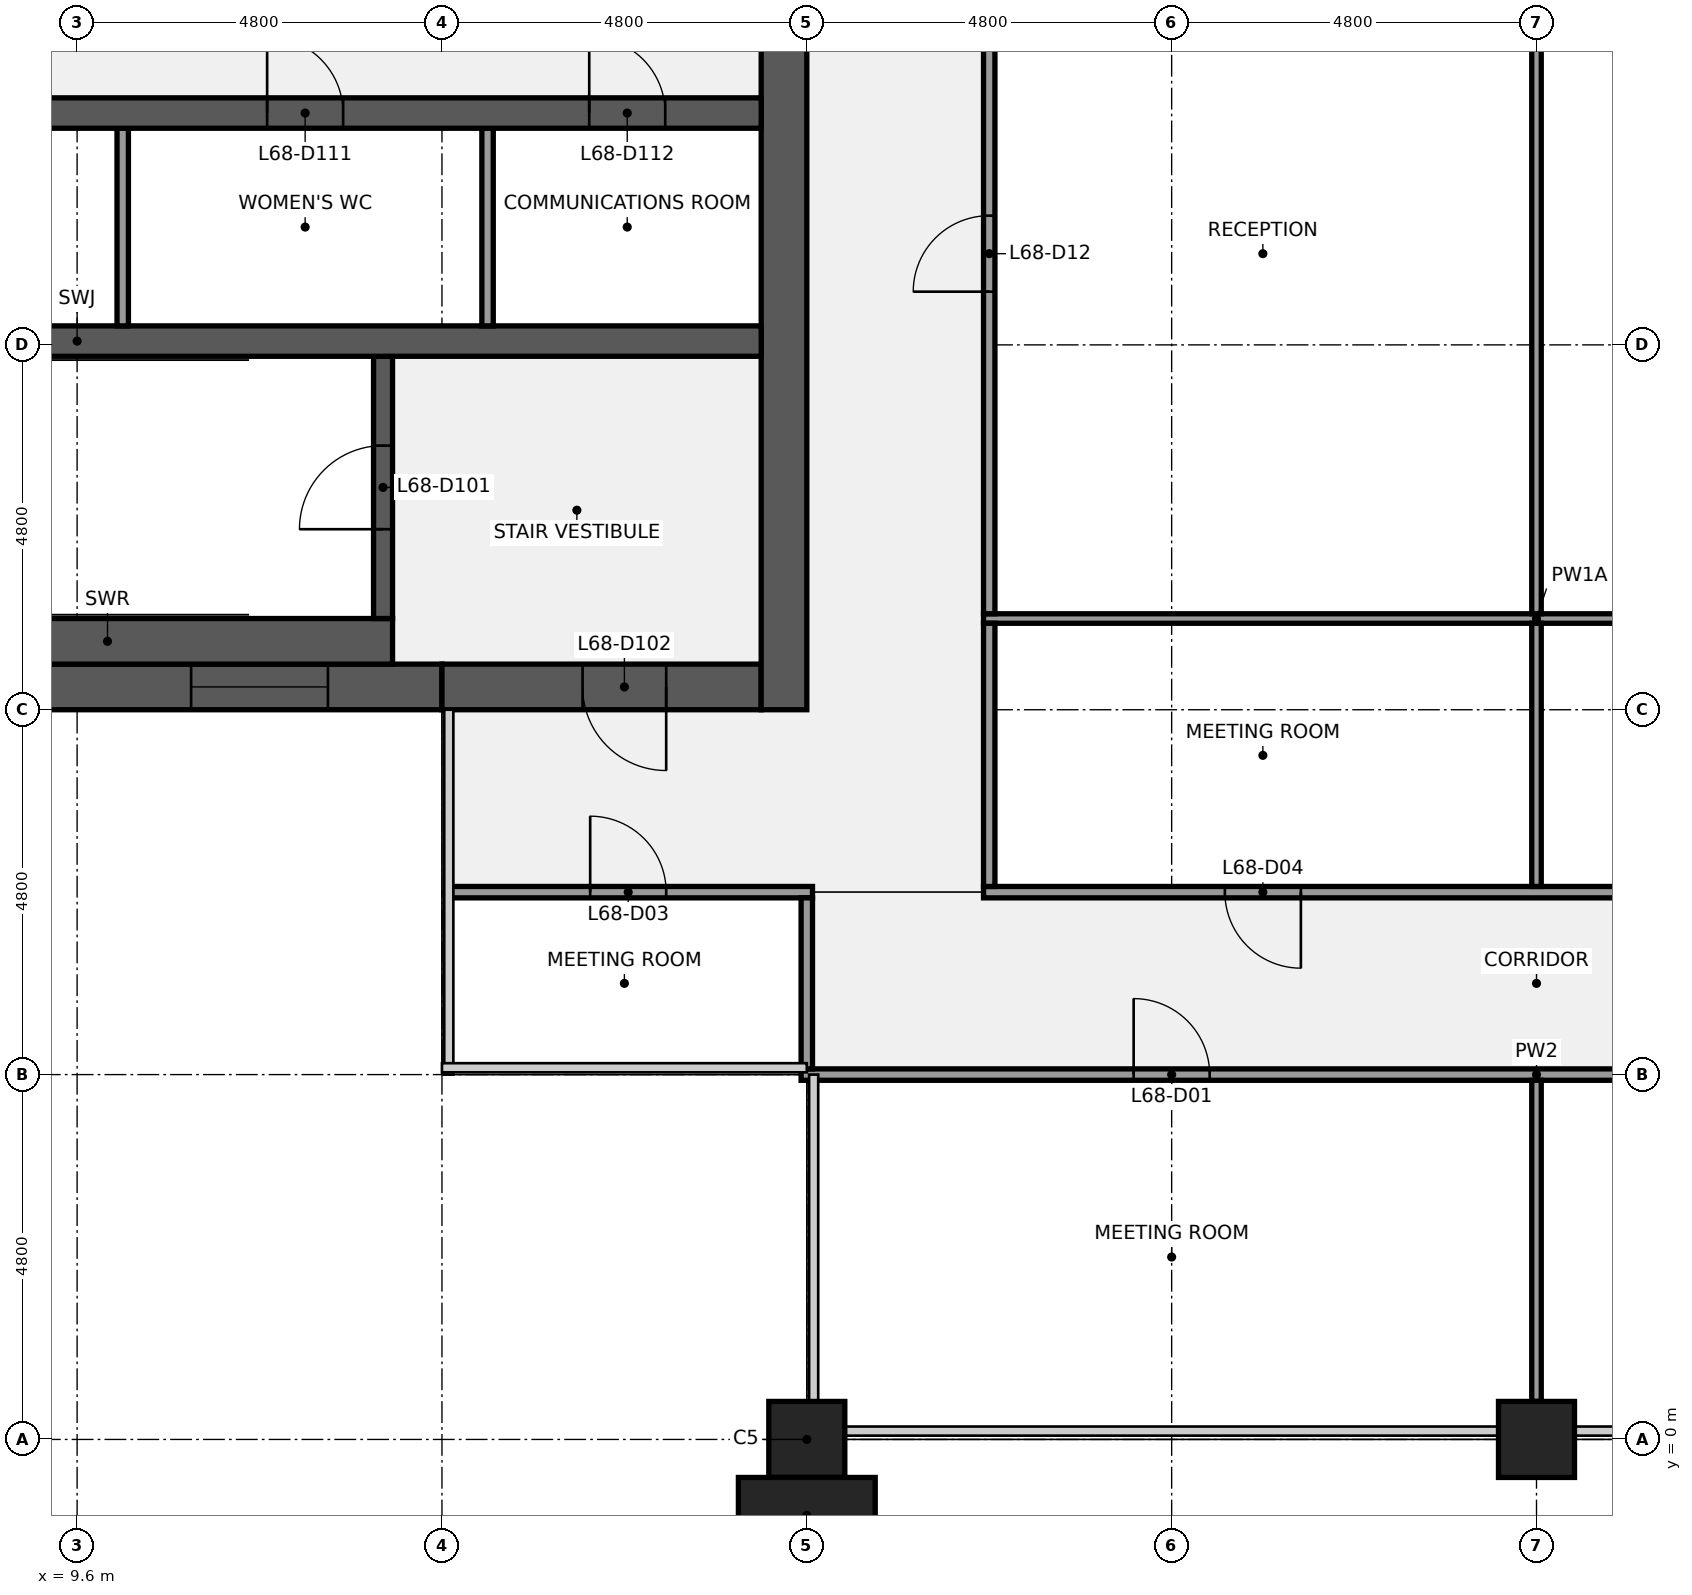
"""IFC4 building model, lengths in metres.
Left out: names, types, materials, properties, quantities, classifications, styles, units other than length and angle.
Written with IfcOpenShell. Run it as: python <this file> out.ifc"""

import sys

from ifc_helpers import new_model, si_unit, direction, frame, frame_2d, origin, origin_2d, place, context, subcontext, project, spatial, rectangle, extrude, element, fill, save


model = new_model("IFC4")
c1 = context("Model", 3, precision=1e-05, world=origin(), true_north=direction((0.0, 1.0)))
c2 = subcontext(c1, "Body", "Model", "MODEL_VIEW")
j1 = project(units=[si_unit("LENGTHUNIT", "METRE"), si_unit("PLANEANGLEUNIT", "RADIAN")], contexts=[c1])
p1 = place(None, origin())
s1 = spatial("IfcSite", under=j1, at=p1, CompositionType="ELEMENT")
p2 = place(p1, origin())
s2 = spatial("IfcBuilding", under=s1, at=p2, CompositionType="ELEMENT")
p3 = place(p2, frame((0.0, 0.0, 310.3)))
s3 = spatial("IfcBuildingStorey", under=s2, at=p3, CompositionType="ELEMENT", Elevation=310.3)
for number, where, z_axis, x_axis in (
    (1, (19.2, 0.0, 0.0), (0.0, 0.0, 1.0), (1.0, 0.0, 0.0)),
    (2, (28.8, 0.0, 0.0), (0.0, 0.0, 1.0), (1.0, 0.0, 0.0)),
):
    element("IfcColumn", number, at=place(p3, frame(where, z_axis=z_axis, x_axis=x_axis)), inside=s3, PredefinedType="COLUMN", context=c2, shape_type="SweptSolid", body=[
        extrude(rectangle(XDim=1.0, YDim=1.0, at=origin_2d()), origin(), (0.0, 0.0, 1.0), 4.0),
    ])
p4 = place(p3, frame((14.4, 9.9, 0.0), z_axis=(0.0, 0.0, 1.0), x_axis=(-1.0, 0.0, 0.0)))
e3 = element("IfcWall", 3, at=p4, inside=s3, PredefinedType="SHEAR", context=c2, shape_type="SweptSolid", body=[
    extrude(rectangle(XDim=13.8, YDim=0.6, at=frame_2d((6.9, 0.0))), origin(), (0.0, 0.0, 1.0), 3.84),
])
p5 = place(p4, frame((6.3, 0.0, 0.9)))
e4 = element("IfcOpeningElement", 4, at=p5, cuts=e3, PredefinedType="OPENING", context=c2, shape_type="SweptSolid", body=[
    extrude(rectangle(XDim=1.8, YDim=1.5, at=frame_2d((0.9, 0.75))), frame((0.0, 0.31, 0.0), z_axis=(0.0, -1.0, 0.0), x_axis=(1.0, 0.0, 0.0)), (0.0, 0.0, 1.0), 0.62),
])
p6 = place(p4, frame((1.5, 0.0, 0.9)))
e5 = element("IfcOpeningElement", 5, at=p6, cuts=e3, PredefinedType="OPENING", context=c2, shape_type="SweptSolid", body=[
    extrude(rectangle(XDim=1.8, YDim=1.5, at=frame_2d((0.9, 0.75))), frame((0.0, 0.31, 0.0), z_axis=(0.0, -1.0, 0.0), x_axis=(1.0, 0.0, 0.0)), (0.0, 0.0, 1.0), 0.62),
])
p7 = place(p3, frame((18.6, 9.9, 0.0), z_axis=(0.0, 0.0, 1.0), x_axis=(-1.0, 0.0, 0.0)))
e6 = element("IfcWall", 6, at=p7, inside=s3, PredefinedType="SHEAR", context=c2, shape_type="SweptSolid", body=[
    extrude(rectangle(XDim=4.2, YDim=0.6, at=frame_2d((2.1, 0.0))), origin(), (0.0, 0.0, 1.0), 3.84),
])
p8 = place(p7, frame((1.25, 0.0, 0.0)))
e7 = element("IfcOpeningElement", 7, at=p8, cuts=e6, PredefinedType="OPENING", context=c2, shape_type="SweptSolid", body=[
    extrude(rectangle(XDim=1.1, YDim=2.1, at=frame_2d((0.55, 1.05))), frame((0.0, 0.31, 0.0), z_axis=(0.0, -1.0, 0.0), x_axis=(1.0, 0.0, 0.0)), (0.0, 0.0, 1.0), 0.62),
])
p9 = place(p3, frame((18.9, 38.4, 0.0), z_axis=(0.0, 0.0, 1.0), x_axis=(0.0, -1.0, 0.0)))
e8 = element("IfcWall", 8, at=p9, inside=s3, PredefinedType="SHEAR", context=c2, shape_type="SweptSolid", body=[
    extrude(rectangle(XDim=28.8, YDim=0.6, at=frame_2d((14.4, 0.0))), origin(), (0.0, 0.0, 1.0), 3.84),
])
p10 = place(p9, frame((18.3, 0.0, 0.0)))
e9 = element("IfcOpeningElement", 9, at=p10, cuts=e8, PredefinedType="OPENING", context=c2, shape_type="SweptSolid", body=[
    extrude(rectangle(XDim=1.8, YDim=2.1, at=frame_2d((0.9, 1.05))), frame((0.0, 0.31, 0.0), z_axis=(0.0, -1.0, 0.0), x_axis=(1.0, 0.0, 0.0)), (0.0, 0.0, 1.0), 0.62),
])
p11 = place(p9, frame((8.7, 0.0, 0.0)))
e10 = element("IfcOpeningElement", 10, at=p11, cuts=e8, PredefinedType="OPENING", context=c2, shape_type="SweptSolid", body=[
    extrude(rectangle(XDim=1.8, YDim=2.1, at=frame_2d((0.9, 1.05))), frame((0.0, 0.31, 0.0), z_axis=(0.0, -1.0, 0.0), x_axis=(1.0, 0.0, 0.0)), (0.0, 0.0, 1.0), 0.62),
])
p12 = place(p3, frame((6.25, 10.5, 0.0), z_axis=(0.0, 0.0, 1.0), x_axis=(1.0, 0.0, 0.0)))
e11 = element("IfcWall", 11, at=p12, inside=s3, PredefinedType="SHEAR", context=c2, shape_type="SweptSolid", body=[
    extrude(rectangle(XDim=7.5, YDim=0.6, at=frame_2d((3.75, 0.0))), origin(), (0.0, 0.0, 1.0), 3.84),
])
p13 = place(p3, frame((13.625, 10.8, 0.0), z_axis=(0.0, 0.0, 1.0), x_axis=(0.0, 1.0, 0.0)))
e12 = element("IfcWall", 12, at=p13, inside=s3, PredefinedType="SHEAR", context=c2, shape_type="SweptSolid", body=[
    extrude(rectangle(XDim=3.45, YDim=0.25, at=frame_2d((1.725, 0.0))), origin(), (0.0, 0.0, 1.0), 3.84),
])
p14 = place(p13, frame((1.175, 0.0, 0.0)))
e13 = element("IfcOpeningElement", 13, at=p14, cuts=e12, PredefinedType="OPENING", context=c2, shape_type="SweptSolid", body=[
    extrude(rectangle(XDim=1.1, YDim=2.1, at=frame_2d((0.55, 1.05))), frame((0.0, 0.135, 0.0), z_axis=(0.0, -1.0, 0.0), x_axis=(1.0, 0.0, 0.0)), (0.0, 0.0, 1.0), 0.27),
])
p15 = place(p3, frame((0.6, 14.45, 0.0), z_axis=(0.0, 0.0, 1.0), x_axis=(1.0, 0.0, 0.0)))
e14 = element("IfcWall", 14, at=p15, inside=s3, PredefinedType="SHEAR", context=c2, shape_type="SweptSolid", body=[
    extrude(rectangle(XDim=18.0, YDim=0.4, at=frame_2d((9.0, 0.0))), origin(), (0.0, 0.0, 1.0), 3.84),
])
for number, where, z_axis, x_axis in (
    (15, (10.2, 14.65, 0.0), (0.0, 0.0, 1.0), (0.0, 1.0, 0.0)),
    (16, (15.0, 14.65, 0.0), (0.0, 0.0, 1.0), (0.0, 1.0, 0.0)),
):
    element("IfcWall", number, at=place(p3, frame(where, z_axis=z_axis, x_axis=x_axis)), inside=s3, PredefinedType="PARTITIONING", context=c2, shape_type="SweptSolid", body=[
        extrude(rectangle(XDim=2.6, YDim=0.15, at=frame_2d((1.3, 0.0))), origin(), (0.0, 0.0, 1.0), 3.84),
    ])
p16 = place(p3, frame((0.6, 17.45, 0.0), z_axis=(0.0, 0.0, 1.0), x_axis=(1.0, 0.0, 0.0)))
e17 = element("IfcWall", 17, at=p16, inside=s3, PredefinedType="SHEAR", context=c2, shape_type="SweptSolid", body=[
    extrude(rectangle(XDim=18.0, YDim=0.4, at=frame_2d((9.0, 0.0))), origin(), (0.0, 0.0, 1.0), 3.84),
])
p17 = place(p16, frame((2.163, 0.0, 0.0)))
e18 = element("IfcOpeningElement", 18, at=p17, cuts=e17, PredefinedType="OPENING", context=c2, shape_type="SweptSolid", body=[
    extrude(rectangle(XDim=1.0, YDim=2.1, at=frame_2d((0.5, 1.05))), frame((0.0, 0.21, 0.0), z_axis=(0.0, -1.0, 0.0), x_axis=(1.0, 0.0, 0.0)), (0.0, 0.0, 1.0), 0.42),
])
p18 = place(p16, frame((7.0, 0.0, 0.0)))
e19 = element("IfcOpeningElement", 19, at=p18, cuts=e17, PredefinedType="OPENING", context=c2, shape_type="SweptSolid", body=[
    extrude(rectangle(XDim=1.0, YDim=2.1, at=frame_2d((0.5, 1.05))), frame((0.0, 0.21, 0.0), z_axis=(0.0, -1.0, 0.0), x_axis=(1.0, 0.0, 0.0)), (0.0, 0.0, 1.0), 0.42),
])
p19 = place(p16, frame((11.5, 0.0, 0.0)))
e20 = element("IfcOpeningElement", 20, at=p19, cuts=e17, PredefinedType="OPENING", context=c2, shape_type="SweptSolid", body=[
    extrude(rectangle(XDim=1.0, YDim=2.1, at=frame_2d((0.5, 1.05))), frame((0.0, 0.21, 0.0), z_axis=(0.0, -1.0, 0.0), x_axis=(1.0, 0.0, 0.0)), (0.0, 0.0, 1.0), 0.42),
])
p20 = place(p16, frame((15.738, 0.0, 0.0)))
e21 = element("IfcOpeningElement", 21, at=p20, cuts=e17, PredefinedType="OPENING", context=c2, shape_type="SweptSolid", body=[
    extrude(rectangle(XDim=1.0, YDim=2.1, at=frame_2d((0.5, 1.05))), frame((0.0, 0.21, 0.0), z_axis=(0.0, -1.0, 0.0), x_axis=(1.0, 0.0, 0.0)), (0.0, 0.0, 1.0), 0.42),
])
p21 = place(p3, frame((19.125, 4.8, 0.0), z_axis=(0.0, 0.0, 1.0), x_axis=(1.0, 0.0, 0.0)))
e22 = element("IfcWall", 22, at=p21, inside=s3, PredefinedType="PARTITIONING", context=c2, shape_type="SweptSolid", body=[
    extrude(rectangle(XDim=19.35, YDim=0.15, at=frame_2d((9.675, 0.0))), origin(), (0.0, 0.0, 1.0), 2.849),
])
p22 = place(p21, frame((4.375, 0.0, 0.0)))
e23 = element("IfcOpeningElement", 23, at=p22, cuts=e22, PredefinedType="OPENING", context=c2, shape_type="SweptSolid", body=[
    extrude(rectangle(XDim=1.0, YDim=2.1, at=frame_2d((0.5, 1.05))), frame((0.0, 0.085, 0.0), z_axis=(0.0, -1.0, 0.0), x_axis=(1.0, 0.0, 0.0)), (0.0, 0.0, 1.0), 0.17),
])
p23 = place(p21, frame((13.975, 0.0, 0.0)))
e24 = element("IfcOpeningElement", 24, at=p23, cuts=e22, PredefinedType="OPENING", context=c2, shape_type="SweptSolid", body=[
    extrude(rectangle(XDim=1.0, YDim=2.1, at=frame_2d((0.5, 1.05))), frame((0.0, 0.085, 0.0), z_axis=(0.0, -1.0, 0.0), x_axis=(1.0, 0.0, 0.0)), (0.0, 0.0, 1.0), 0.17),
])
p24 = place(p3, frame((14.5, 7.2, 0.0), z_axis=(0.0, 0.0, 1.0), x_axis=(1.0, 0.0, 0.0)))
e25 = element("IfcWall", 25, at=p24, inside=s3, PredefinedType="PARTITIONING", context=c2, shape_type="SweptSolid", body=[
    extrude(rectangle(XDim=4.775, YDim=0.15, at=frame_2d((2.387, 0.0))), origin(), (0.0, 0.0, 1.0), 2.849),
])
p25 = place(p24, frame((1.85, 0.0, 0.0)))
e26 = element("IfcOpeningElement", 26, at=p25, cuts=e25, PredefinedType="OPENING", context=c2, shape_type="SweptSolid", body=[
    extrude(rectangle(XDim=1.0, YDim=2.1, at=frame_2d((0.5, 1.05))), frame((0.0, 0.085, 0.0), z_axis=(0.0, -1.0, 0.0), x_axis=(1.0, 0.0, 0.0)), (0.0, 0.0, 1.0), 0.17),
])
p26 = place(p3, frame((21.525, 7.2, 0.0), z_axis=(0.0, 0.0, 1.0), x_axis=(1.0, 0.0, 0.0)))
e27 = element("IfcWall", 27, at=p26, inside=s3, PredefinedType="PARTITIONING", context=c2, shape_type="SweptSolid", body=[
    extrude(rectangle(XDim=14.55, YDim=0.15, at=frame_2d((7.275, 0.0))), origin(), (0.0, 0.0, 1.0), 2.849),
])
p27 = place(p26, frame((3.175, 0.0, 0.0)))
e28 = element("IfcOpeningElement", 28, at=p27, cuts=e27, PredefinedType="OPENING", context=c2, shape_type="SweptSolid", body=[
    extrude(rectangle(XDim=1.0, YDim=2.1, at=frame_2d((0.5, 1.05))), frame((0.0, 0.085, 0.0), z_axis=(0.0, -1.0, 0.0), x_axis=(1.0, 0.0, 0.0)), (0.0, 0.0, 1.0), 0.17),
])
p28 = place(p26, frame((10.375, 0.0, 0.0)))
e29 = element("IfcOpeningElement", 29, at=p28, cuts=e27, PredefinedType="OPENING", context=c2, shape_type="SweptSolid", body=[
    extrude(rectangle(XDim=1.0, YDim=2.1, at=frame_2d((0.5, 1.05))), frame((0.0, 0.085, 0.0), z_axis=(0.0, -1.0, 0.0), x_axis=(1.0, 0.0, 0.0)), (0.0, 0.0, 1.0), 0.17),
])
p29 = place(p3, frame((21.525, 10.8, 0.0), z_axis=(0.0, 0.0, 1.0), x_axis=(1.0, 0.0, 0.0)))
e30 = element("IfcWall", 30, at=p29, inside=s3, PredefinedType="PARTITIONING", context=c2, shape_type="SweptSolid", body=[
    extrude(rectangle(XDim=14.55, YDim=0.125, at=frame_2d((7.275, 0.0))), origin(), (0.0, 0.0, 1.0), 2.849),
])
p30 = place(p3, frame((19.2, 4.875, 0.0), z_axis=(0.0, 0.0, 1.0), x_axis=(0.0, 1.0, 0.0)))
e31 = element("IfcWall", 31, at=p30, inside=s3, PredefinedType="PARTITIONING", context=c2, shape_type="SweptSolid", body=[
    extrude(rectangle(XDim=2.25, YDim=0.15, at=frame_2d((1.125, 0.0))), origin(), (0.0, 0.0, 1.0), 2.849),
])
p31 = place(p3, frame((21.6, 7.275, 0.0), z_axis=(0.0, 0.0, 1.0), x_axis=(0.0, 1.0, 0.0)))
e32 = element("IfcWall", 32, at=p31, inside=s3, PredefinedType="PARTITIONING", context=c2, shape_type="SweptSolid", body=[
    extrude(rectangle(XDim=3.463, YDim=0.15, at=frame_2d((1.731, 0.0))), origin(), (0.0, 0.0, 1.0), 2.849),
])
p32 = place(p3, frame((21.6, 10.863, 0.0), z_axis=(0.0, 0.0, 1.0), x_axis=(0.0, 1.0, 0.0)))
e33 = element("IfcWall", 33, at=p32, inside=s3, PredefinedType="PARTITIONING", context=c2, shape_type="SweptSolid", body=[
    extrude(rectangle(XDim=9.475, YDim=0.15, at=frame_2d((4.737, 0.0))), origin(), (0.0, 0.0, 1.0), 2.849),
])
p33 = place(p32, frame((4.238, 0.0, 0.0)))
e34 = element("IfcOpeningElement", 34, at=p33, cuts=e33, PredefinedType="OPENING", context=c2, shape_type="SweptSolid", body=[
    extrude(rectangle(XDim=1.0, YDim=2.1, at=frame_2d((0.5, 1.05))), frame((0.0, 0.085, 0.0), z_axis=(0.0, -1.0, 0.0), x_axis=(1.0, 0.0, 0.0)), (0.0, 0.0, 1.0), 0.17),
])
p34 = place(p3, frame((28.8, 0.5, 0.0), z_axis=(0.0, 0.0, 1.0), x_axis=(0.0, 1.0, 0.0)))
e35 = element("IfcWall", 35, at=p34, inside=s3, PredefinedType="PARTITIONING", context=c2, shape_type="SweptSolid", body=[
    extrude(rectangle(XDim=4.225, YDim=0.125, at=frame_2d((2.113, 0.0))), origin(), (0.0, 0.0, 1.0), 2.849),
])
p35 = place(p3, frame((28.8, 7.275, 0.0), z_axis=(0.0, 0.0, 1.0), x_axis=(0.0, 1.0, 0.0)))
e36 = element("IfcWall", 36, at=p35, inside=s3, PredefinedType="PARTITIONING", context=c2, shape_type="SweptSolid", body=[
    extrude(rectangle(XDim=3.463, YDim=0.125, at=frame_2d((1.731, 0.0))), origin(), (0.0, 0.0, 1.0), 2.849),
])
p36 = place(p3, frame((28.8, 10.863, 0.0), z_axis=(0.0, 0.0, 1.0), x_axis=(0.0, 1.0, 0.0)))
e37 = element("IfcWall", 37, at=p36, inside=s3, PredefinedType="PARTITIONING", context=c2, shape_type="SweptSolid", body=[
    extrude(rectangle(XDim=9.475, YDim=0.125, at=frame_2d((4.737, 0.0))), origin(), (0.0, 0.0, 1.0), 2.849),
])
p37 = place(p3, frame((19.2, -1.0, 0.0), z_axis=(0.0, 0.0, 1.0), x_axis=(1.0, 0.0, 0.0)))
e38 = element("IfcColumn", 38, at=p37, inside=s3, PredefinedType="PILASTER", context=c2, shape_type="SweptSolid", body=[
    extrude(rectangle(XDim=1.8, YDim=1.0, at=origin_2d()), origin(), (0.0, 0.0, 1.0), 4.0),
])
p38 = place(p14, origin())
e39 = element("IfcDoor", 39, at=p38, inside=s3, OperationType="SINGLE_SWING_LEFT", PredefinedType="DOOR", context=c2, shape_type="SweptSolid", body=[
    extrude(rectangle(XDim=1.1, YDim=2.1, at=frame_2d((0.55, 1.05))), frame((0.0, 0.025, 0.0), z_axis=(0.0, -1.0, 0.0), x_axis=(1.0, 0.0, 0.0)), (0.0, 0.0, 1.0), 0.05),
])
fill(e13, e39)
p39 = place(p8, origin())
e40 = element("IfcDoor", 40, at=p39, inside=s3, OperationType="SINGLE_SWING_LEFT", PredefinedType="DOOR", context=c2, shape_type="SweptSolid", body=[
    extrude(rectangle(XDim=1.1, YDim=2.1, at=frame_2d((0.55, 1.05))), frame((0.0, 0.025, 0.0), z_axis=(0.0, -1.0, 0.0), x_axis=(1.0, 0.0, 0.0)), (0.0, 0.0, 1.0), 0.05),
])
fill(e7, e40)
p40 = place(p19, origin())
e41 = element("IfcDoor", 41, at=p40, inside=s3, OperationType="SINGLE_SWING_LEFT", PredefinedType="DOOR", context=c2, shape_type="SweptSolid", body=[
    extrude(rectangle(XDim=1.0, YDim=2.1, at=frame_2d((0.5, 1.05))), frame((0.0, 0.025, 0.0), z_axis=(0.0, -1.0, 0.0), x_axis=(1.0, 0.0, 0.0)), (0.0, 0.0, 1.0), 0.05),
])
fill(e20, e41)
p41 = place(p20, origin())
e42 = element("IfcDoor", 42, at=p41, inside=s3, OperationType="SINGLE_SWING_LEFT", PredefinedType="DOOR", context=c2, shape_type="SweptSolid", body=[
    extrude(rectangle(XDim=1.0, YDim=2.1, at=frame_2d((0.5, 1.05))), frame((0.0, 0.025, 0.0), z_axis=(0.0, -1.0, 0.0), x_axis=(1.0, 0.0, 0.0)), (0.0, 0.0, 1.0), 0.05),
])
fill(e21, e42)
p42 = place(p6, origin())
e43 = element("IfcWindow", 43, at=p42, inside=s3, PartitioningType="SINGLE_PANEL", PredefinedType="WINDOW", context=c2, shape_type="SweptSolid", body=[
    extrude(rectangle(XDim=1.8, YDim=1.5, at=frame_2d((0.9, 0.75))), frame((0.0, 0.03, 0.0), z_axis=(0.0, -1.0, 0.0), x_axis=(1.0, 0.0, 0.0)), (0.0, 0.0, 1.0), 0.06),
])
fill(e5, e43)
p43 = place(p22, origin())
e44 = element("IfcDoor", 44, at=p43, inside=s3, OperationType="SINGLE_SWING_LEFT", PredefinedType="DOOR", context=c2, shape_type="SweptSolid", body=[
    extrude(rectangle(XDim=1.0, YDim=2.1, at=frame_2d((0.5, 1.05))), frame((0.0, 0.025, 0.0), z_axis=(0.0, -1.0, 0.0), x_axis=(1.0, 0.0, 0.0)), (0.0, 0.0, 1.0), 0.05),
])
fill(e23, e44)
p44 = place(p25, origin())
e45 = element("IfcDoor", 45, at=p44, inside=s3, OperationType="SINGLE_SWING_LEFT", PredefinedType="DOOR", context=c2, shape_type="SweptSolid", body=[
    extrude(rectangle(XDim=1.0, YDim=2.1, at=frame_2d((0.5, 1.05))), frame((0.0, 0.025, 0.0), z_axis=(0.0, -1.0, 0.0), x_axis=(1.0, 0.0, 0.0)), (0.0, 0.0, 1.0), 0.05),
])
fill(e26, e45)
p45 = place(p27, origin())
e46 = element("IfcDoor", 46, at=p45, inside=s3, OperationType="SINGLE_SWING_RIGHT", PredefinedType="DOOR", context=c2, shape_type="SweptSolid", body=[
    extrude(rectangle(XDim=1.0, YDim=2.1, at=frame_2d((0.5, 1.05))), frame((0.0, 0.025, 0.0), z_axis=(0.0, -1.0, 0.0), x_axis=(1.0, 0.0, 0.0)), (0.0, 0.0, 1.0), 0.05),
])
fill(e28, e46)
p46 = place(p33, origin())
e47 = element("IfcDoor", 47, at=p46, inside=s3, OperationType="SINGLE_SWING_LEFT", PredefinedType="DOOR", context=c2, shape_type="SweptSolid", body=[
    extrude(rectangle(XDim=1.0, YDim=2.1, at=frame_2d((0.5, 1.05))), frame((0.0, 0.025, 0.0), z_axis=(0.0, -1.0, 0.0), x_axis=(1.0, 0.0, 0.0)), (0.0, 0.0, 1.0), 0.05),
])
fill(e34, e47)
save(model, sys.argv[1])
